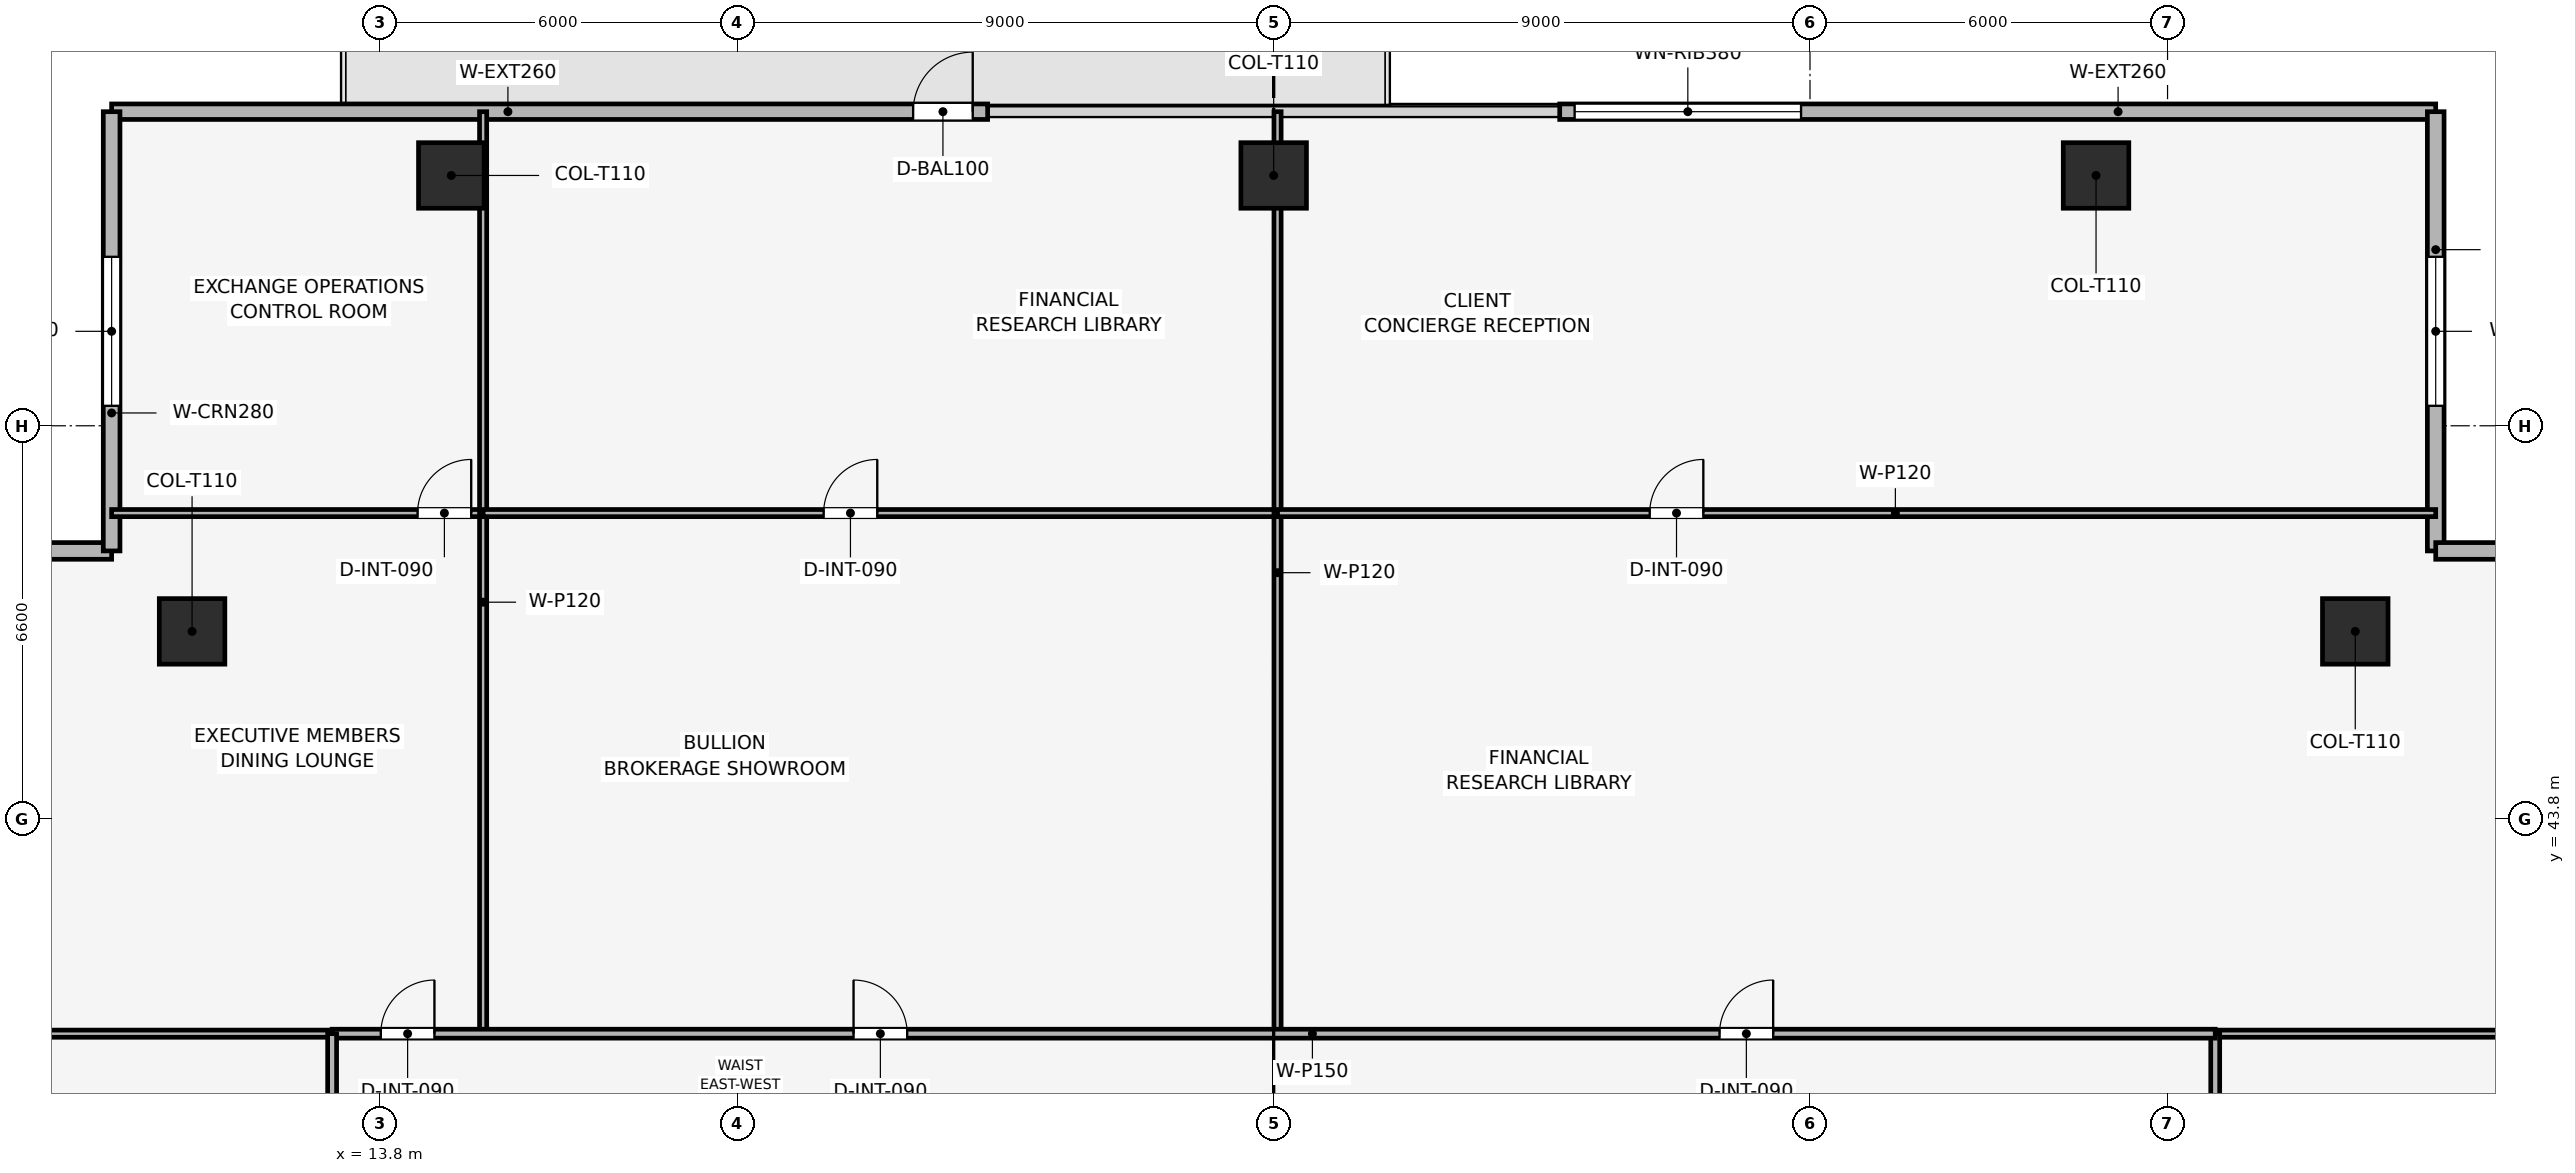
"""IFC4 building model, lengths in metres.
Left out: names, types, materials, properties, quantities, classifications, styles, units other than length and angle.
Written with IfcOpenShell. Run it as: python <this file> out.ifc"""

import sys

from ifc_helpers import new_model, si_unit, direction, frame, frame_2d, origin, origin_2d, place, context, subcontext, project, spatial, rectangle, extrude, element, fill, save


model = new_model("IFC4")
c1 = context("Model", 3, precision=1e-05, world=origin(), true_north=direction((0.0, 1.0)))
c2 = subcontext(c1, "Body", "Model", "MODEL_VIEW")
j1 = project(units=[si_unit("LENGTHUNIT", "METRE"), si_unit("PLANEANGLEUNIT", "RADIAN")], contexts=[c1])
p1 = place(None, origin())
s1 = spatial("IfcSite", under=j1, at=p1, CompositionType="ELEMENT")
p2 = place(p1, origin())
s2 = spatial("IfcBuilding", under=s1, at=p2, CompositionType="ELEMENT")
p3 = place(p2, frame((0.0, 0.0, 211.2)))
s3 = spatial("IfcBuildingStorey", under=s2, at=p3, CompositionType="ELEMENT", Elevation=211.2)
for number, where, z_axis, x_axis in (
    (1, (42.6, 54.6, 0.003), (0.0, 0.0, 1.0), (1.0, 0.0, 0.0)),
    (2, (28.8, 54.6, 0.003), (0.0, 0.0, 1.0), (1.0, 0.0, 0.0)),
    (3, (15.0, 54.6, 0.003), (0.0, 0.0, 1.0), (1.0, 0.0, 0.0)),
    (4, (46.95, 46.95, 0.003), (0.0, 0.0, 1.0), (1.0, 0.0, 0.0)),
    (5, (10.65, 46.95, 0.003), (0.0, 0.0, 1.0), (1.0, 0.0, 0.0)),
):
    element("IfcColumn", number, at=place(p3, frame(where, z_axis=z_axis, x_axis=x_axis)), inside=s3, PredefinedType="COLUMN", context=c2, shape_type="SweptSolid", body=[
        extrude(rectangle(XDim=1.1, YDim=1.1, at=origin_2d()), origin(), (0.0, 0.0, 1.0), 3.494),
    ])
p4 = place(p3, frame((9.3, 55.67, 0.0), z_axis=(0.0, 0.0, 1.0), x_axis=(1.0, 0.0, 0.0)))
e6 = element("IfcWall", 6, at=p4, inside=s3, PredefinedType="SOLIDWALL", context=c2, shape_type="SweptSolid", body=[
    extrude(rectangle(XDim=14.7, YDim=0.26, at=frame_2d((7.35, 0.0))), origin(), (0.0, 0.0, 1.0), 3.5),
])
p5 = place(p4, frame((13.45, 0.0, 0.0)))
e7 = element("IfcOpeningElement", 7, at=p5, cuts=e6, PredefinedType="OPENING", context=c2, shape_type="SweptSolid", body=[
    extrude(rectangle(XDim=1.0, YDim=2.2, at=frame_2d((0.5, 1.1))), frame((0.0, 0.14, 0.0), z_axis=(0.0, -1.0, 0.0), x_axis=(1.0, 0.0, 0.0)), (0.0, 0.0, 1.0), 0.28),
])
p6 = place(p3, frame((33.6, 55.67, 0.0), z_axis=(0.0, 0.0, 1.0), x_axis=(1.0, 0.0, 0.0)))
e8 = element("IfcWall", 8, at=p6, inside=s3, PredefinedType="SOLIDWALL", context=c2, shape_type="SweptSolid", body=[
    extrude(rectangle(XDim=14.7, YDim=0.26, at=frame_2d((7.35, 0.0))), origin(), (0.0, 0.0, 1.0), 3.5),
])
p7 = place(p6, frame((0.25, 0.0, 0.9)))
e9 = element("IfcOpeningElement", 9, at=p7, cuts=e8, PredefinedType="OPENING", context=c2, shape_type="SweptSolid", body=[
    extrude(rectangle(XDim=3.8, YDim=1.9, at=frame_2d((1.9, 0.95))), frame((0.0, 0.14, 0.0), z_axis=(0.0, -1.0, 0.0), x_axis=(1.0, 0.0, 0.0)), (0.0, 0.0, 1.0), 0.28),
])
p8 = place(p3, frame((1.93, 48.3, 0.0), z_axis=(0.0, 0.0, 1.0), x_axis=(1.0, 0.0, 0.0)))
e10 = element("IfcWall", 10, at=p8, inside=s3, PredefinedType="SOLIDWALL", context=c2, shape_type="SweptSolid", body=[
    extrude(rectangle(XDim=7.37, YDim=0.28, at=frame_2d((3.685, 0.0))), origin(), (0.0, 0.0, 1.0), 3.5),
])
p9 = place(p8, frame((2.435, 0.0, 0.9)))
e11 = element("IfcOpeningElement", 11, at=p9, cuts=e10, PredefinedType="OPENING", context=c2, shape_type="SweptSolid", body=[
    extrude(rectangle(XDim=2.5, YDim=1.9, at=frame_2d((1.25, 0.95))), frame((0.0, 0.15, 0.0), z_axis=(0.0, -1.0, 0.0), x_axis=(1.0, 0.0, 0.0)), (0.0, 0.0, 1.0), 0.3),
])
p10 = place(p3, frame((9.3, 48.3, 0.0), z_axis=(0.0, 0.0, 1.0), x_axis=(0.0, 1.0, 0.0)))
e12 = element("IfcWall", 12, at=p10, inside=s3, PredefinedType="SOLIDWALL", context=c2, shape_type="SweptSolid", body=[
    extrude(rectangle(XDim=7.37, YDim=0.28, at=frame_2d((3.685, 0.0))), origin(), (0.0, 0.0, 1.0), 3.5),
])
p11 = place(p10, frame((2.435, 0.0, 0.9)))
e13 = element("IfcOpeningElement", 13, at=p11, cuts=e12, PredefinedType="OPENING", context=c2, shape_type="SweptSolid", body=[
    extrude(rectangle(XDim=2.5, YDim=1.9, at=frame_2d((1.25, 0.95))), frame((0.0, 0.15, 0.0), z_axis=(0.0, -1.0, 0.0), x_axis=(1.0, 0.0, 0.0)), (0.0, 0.0, 1.0), 0.3),
])
p12 = place(p3, frame((48.3, 55.67, 0.0), z_axis=(0.0, 0.0, 1.0), x_axis=(0.0, -1.0, 0.0)))
e14 = element("IfcWall", 14, at=p12, inside=s3, PredefinedType="SOLIDWALL", context=c2, shape_type="SweptSolid", body=[
    extrude(rectangle(XDim=7.37, YDim=0.28, at=frame_2d((3.685, 0.0))), origin(), (0.0, 0.0, 1.0), 3.5),
])
p13 = place(p12, frame((2.435, 0.0, 0.9)))
e15 = element("IfcOpeningElement", 15, at=p13, cuts=e14, PredefinedType="OPENING", context=c2, shape_type="SweptSolid", body=[
    extrude(rectangle(XDim=2.5, YDim=1.9, at=frame_2d((1.25, 0.95))), frame((0.0, 0.15, 0.0), z_axis=(0.0, -1.0, 0.0), x_axis=(1.0, 0.0, 0.0)), (0.0, 0.0, 1.0), 0.3),
])
p14 = place(p3, frame((48.3, 48.3, 0.0), z_axis=(0.0, 0.0, 1.0), x_axis=(1.0, 0.0, 0.0)))
e16 = element("IfcWall", 16, at=p14, inside=s3, PredefinedType="SOLIDWALL", context=c2, shape_type="SweptSolid", body=[
    extrude(rectangle(XDim=7.37, YDim=0.28, at=frame_2d((3.685, 0.0))), origin(), (0.0, 0.0, 1.0), 3.5),
])
p15 = place(p14, frame((2.435, 0.0, 0.9)))
e17 = element("IfcOpeningElement", 17, at=p15, cuts=e16, PredefinedType="OPENING", context=c2, shape_type="SweptSolid", body=[
    extrude(rectangle(XDim=2.5, YDim=1.9, at=frame_2d((1.25, 0.95))), frame((0.0, 0.15, 0.0), z_axis=(0.0, -1.0, 0.0), x_axis=(1.0, 0.0, 0.0)), (0.0, 0.0, 1.0), 0.3),
])
p16 = place(p3, frame((9.3, 48.935, 0.0), z_axis=(0.0, 0.0, 1.0), x_axis=(1.0, 0.0, 0.0)))
e18 = element("IfcWall", 18, at=p16, inside=s3, PredefinedType="PARTITIONING", context=c2, shape_type="SweptSolid", body=[
    extrude(rectangle(XDim=6.234, YDim=0.12, at=frame_2d((3.117, 0.0))), origin(), (0.0, 0.0, 1.0), 2.885),
])
p17 = place(p16, frame((5.134, 0.0, 0.0)))
e19 = element("IfcOpeningElement", 19, at=p17, cuts=e18, PredefinedType="OPENING", context=c2, shape_type="SweptSolid", body=[
    extrude(rectangle(XDim=0.9, YDim=2.1, at=frame_2d((0.45, 1.05))), frame((0.0, 0.07, 0.0), z_axis=(0.0, -1.0, 0.0), x_axis=(1.0, 0.0, 0.0)), (0.0, 0.0, 1.0), 0.14),
])
p18 = place(p3, frame((15.534, 40.2, 0.0), z_axis=(0.0, 0.0, 1.0), x_axis=(0.0, 1.0, 0.0)))
e20 = element("IfcWall", 20, at=p18, inside=s3, PredefinedType="PARTITIONING", context=c2, shape_type="SweptSolid", body=[
    extrude(rectangle(XDim=15.47, YDim=0.12, at=frame_2d((7.735, 0.0))), origin(), (0.0, 0.0, 1.0), 2.885),
])
p19 = place(p3, frame((15.534, 48.935, 0.0), z_axis=(0.0, 0.0, 1.0), x_axis=(1.0, 0.0, 0.0)))
e21 = element("IfcWall", 21, at=p19, inside=s3, PredefinedType="PARTITIONING", context=c2, shape_type="SweptSolid", body=[
    extrude(rectangle(XDim=13.331, YDim=0.12, at=frame_2d((6.666, 0.0))), origin(), (0.0, 0.0, 1.0), 3.035),
])
p20 = place(p19, frame((5.714, 0.0, 0.0)))
e22 = element("IfcOpeningElement", 22, at=p20, cuts=e21, PredefinedType="OPENING", context=c2, shape_type="SweptSolid", body=[
    extrude(rectangle(XDim=0.9, YDim=2.1, at=frame_2d((0.45, 1.05))), frame((0.0, 0.07, 0.0), z_axis=(0.0, -1.0, 0.0), x_axis=(1.0, 0.0, 0.0)), (0.0, 0.0, 1.0), 0.14),
])
p21 = place(p3, frame((28.865, 40.2, 0.0), z_axis=(0.0, 0.0, 1.0), x_axis=(0.0, 1.0, 0.0)))
e23 = element("IfcWall", 23, at=p21, inside=s3, PredefinedType="PARTITIONING", context=c2, shape_type="SweptSolid", body=[
    extrude(rectangle(XDim=15.47, YDim=0.12, at=frame_2d((7.735, 0.0))), origin(), (0.0, 0.0, 1.0), 2.985),
])
p22 = place(p3, frame((28.865, 48.935, 0.0), z_axis=(0.0, 0.0, 1.0), x_axis=(1.0, 0.0, 0.0)))
e24 = element("IfcWall", 24, at=p22, inside=s3, PredefinedType="PARTITIONING", context=c2, shape_type="SweptSolid", body=[
    extrude(rectangle(XDim=19.435, YDim=0.12, at=frame_2d((9.718, 0.0))), origin(), (0.0, 0.0, 1.0), 2.885),
])
p23 = place(p22, frame((6.245, 0.0, 0.0)))
e25 = element("IfcOpeningElement", 25, at=p23, cuts=e24, PredefinedType="OPENING", context=c2, shape_type="SweptSolid", body=[
    extrude(rectangle(XDim=0.9, YDim=2.1, at=frame_2d((0.45, 1.05))), frame((0.0, 0.07, 0.0), z_axis=(0.0, -1.0, 0.0), x_axis=(1.0, 0.0, 0.0)), (0.0, 0.0, 1.0), 0.14),
])
p24 = place(p3, frame((1.93, 40.2, 0.0), z_axis=(0.0, 0.0, 1.0), x_axis=(1.0, 0.0, 0.0)))
e26 = element("IfcWall", 26, at=p24, inside=s3, PredefinedType="PARTITIONING", context=c2, shape_type="SweptSolid", body=[
    extrude(rectangle(XDim=11.07, YDim=0.12, at=frame_2d((5.535, 0.0))), origin(), (0.0, 0.0, 1.0), 2.885),
])
p25 = place(p3, frame((44.6, 40.2, 0.0), z_axis=(0.0, 0.0, 1.0), x_axis=(1.0, 0.0, 0.0)))
e27 = element("IfcWall", 27, at=p25, inside=s3, PredefinedType="PARTITIONING", context=c2, shape_type="SweptSolid", body=[
    extrude(rectangle(XDim=11.07, YDim=0.12, at=frame_2d((5.535, 0.0))), origin(), (0.0, 0.0, 1.0), 2.885),
])
p26 = place(p3, frame((44.6, 37.8, 0.0), z_axis=(0.0, 0.0, 1.0), x_axis=(0.0, 1.0, 0.0)))
e28 = element("IfcWall", 28, at=p26, inside=s3, PredefinedType="PARTITIONING", context=c2, shape_type="SweptSolid", body=[
    extrude(rectangle(XDim=2.4, YDim=0.15, at=frame_2d((1.2, 0.0))), origin(), (0.0, 0.0, 1.0), 3.5),
])
p27 = place(p3, frame((13.0, 40.2, 0.0), z_axis=(0.0, 0.0, 1.0), x_axis=(1.0, 0.0, 0.0)))
e29 = element("IfcWall", 29, at=p27, inside=s3, PredefinedType="PARTITIONING", context=c2, shape_type="SweptSolid", body=[
    extrude(rectangle(XDim=31.6, YDim=0.15, at=frame_2d((15.8, 0.0))), origin(), (0.0, 0.0, 1.0), 3.035),
])
p28 = place(p27, frame((0.817, 0.0, 0.0)))
e30 = element("IfcOpeningElement", 30, at=p28, cuts=e29, PredefinedType="OPENING", context=c2, shape_type="SweptSolid", body=[
    extrude(rectangle(XDim=0.9, YDim=2.1, at=frame_2d((0.45, 1.05))), frame((0.0, 0.085, 0.0), z_axis=(0.0, -1.0, 0.0), x_axis=(1.0, 0.0, 0.0)), (0.0, 0.0, 1.0), 0.17),
])
p29 = place(p27, frame((8.75, 0.0, 0.0)))
e31 = element("IfcOpeningElement", 31, at=p29, cuts=e29, PredefinedType="OPENING", context=c2, shape_type="SweptSolid", body=[
    extrude(rectangle(XDim=0.9, YDim=2.1, at=frame_2d((0.45, 1.05))), frame((0.0, 0.085, 0.0), z_axis=(0.0, -1.0, 0.0), x_axis=(1.0, 0.0, 0.0)), (0.0, 0.0, 1.0), 0.17),
])
p30 = place(p27, frame((23.282, 0.0, 0.0)))
e32 = element("IfcOpeningElement", 32, at=p30, cuts=e29, PredefinedType="OPENING", context=c2, shape_type="SweptSolid", body=[
    extrude(rectangle(XDim=0.9, YDim=2.1, at=frame_2d((0.45, 1.05))), frame((0.0, 0.085, 0.0), z_axis=(0.0, -1.0, 0.0), x_axis=(1.0, 0.0, 0.0)), (0.0, 0.0, 1.0), 0.17),
])
p31 = place(p3, frame((13.0, 17.4, 0.0), z_axis=(0.0, 0.0, 1.0), x_axis=(0.0, 1.0, 0.0)))
e33 = element("IfcWall", 33, at=p31, inside=s3, PredefinedType="PARTITIONING", context=c2, shape_type="SweptSolid", body=[
    extrude(rectangle(XDim=22.8, YDim=0.15, at=frame_2d((11.4, 0.0))), origin(), (0.0, 0.0, 1.0), 3.035),
])
p32 = place(p31, frame((10.95, 0.0, 0.0)))
e34 = element("IfcOpeningElement", 34, at=p32, cuts=e33, PredefinedType="OPENING", context=c2, shape_type="SweptSolid", body=[
    extrude(rectangle(XDim=0.9, YDim=2.1, at=frame_2d((0.45, 1.05))), frame((0.0, 0.085, 0.0), z_axis=(0.0, -1.0, 0.0), x_axis=(1.0, 0.0, 0.0)), (0.0, 0.0, 1.0), 0.17),
])
p33 = place(p5, origin())
e35 = element("IfcDoor", 35, at=p33, inside=s3, OperationType="SINGLE_SWING_RIGHT", PredefinedType="DOOR", context=c2, shape_type="SweptSolid", body=[
    extrude(rectangle(XDim=1.0, YDim=2.2, at=frame_2d((0.5, 1.1))), frame((0.0, 0.025, 0.0), z_axis=(0.0, -1.0, 0.0), x_axis=(1.0, 0.0, 0.0)), (0.0, 0.0, 1.0), 0.05),
])
fill(e7, e35)
p34 = place(p7, origin())
e36 = element("IfcWindow", 36, at=p34, inside=s3, PartitioningType="SINGLE_PANEL", PredefinedType="WINDOW", context=c2, shape_type="SweptSolid", body=[
    extrude(rectangle(XDim=3.8, YDim=1.9, at=frame_2d((1.9, 0.95))), frame((0.0, 0.03, 0.0), z_axis=(0.0, -1.0, 0.0), x_axis=(1.0, 0.0, 0.0)), (0.0, 0.0, 1.0), 0.06),
])
fill(e9, e36)
p35 = place(p11, origin())
e37 = element("IfcWindow", 37, at=p35, inside=s3, PartitioningType="SINGLE_PANEL", PredefinedType="WINDOW", context=c2, shape_type="SweptSolid", body=[
    extrude(rectangle(XDim=2.5, YDim=1.9, at=frame_2d((1.25, 0.95))), frame((0.0, 0.03, 0.0), z_axis=(0.0, -1.0, 0.0), x_axis=(1.0, 0.0, 0.0)), (0.0, 0.0, 1.0), 0.06),
])
fill(e13, e37)
p36 = place(p13, origin())
e38 = element("IfcWindow", 38, at=p36, inside=s3, PartitioningType="SINGLE_PANEL", PredefinedType="WINDOW", context=c2, shape_type="SweptSolid", body=[
    extrude(rectangle(XDim=2.5, YDim=1.9, at=frame_2d((1.25, 0.95))), frame((0.0, 0.03, 0.0), z_axis=(0.0, -1.0, 0.0), x_axis=(1.0, 0.0, 0.0)), (0.0, 0.0, 1.0), 0.06),
])
fill(e15, e38)
p37 = place(p17, origin())
e39 = element("IfcDoor", 39, at=p37, inside=s3, OperationType="SINGLE_SWING_RIGHT", PredefinedType="DOOR", context=c2, shape_type="SweptSolid", body=[
    extrude(rectangle(XDim=0.9, YDim=2.1, at=frame_2d((0.45, 1.05))), frame((0.0, 0.025, 0.0), z_axis=(0.0, -1.0, 0.0), x_axis=(1.0, 0.0, 0.0)), (0.0, 0.0, 1.0), 0.05),
])
fill(e19, e39)
p38 = place(p20, origin())
e40 = element("IfcDoor", 40, at=p38, inside=s3, OperationType="SINGLE_SWING_RIGHT", PredefinedType="DOOR", context=c2, shape_type="SweptSolid", body=[
    extrude(rectangle(XDim=0.9, YDim=2.1, at=frame_2d((0.45, 1.05))), frame((0.0, 0.025, 0.0), z_axis=(0.0, -1.0, 0.0), x_axis=(1.0, 0.0, 0.0)), (0.0, 0.0, 1.0), 0.05),
])
fill(e22, e40)
p39 = place(p23, origin())
e41 = element("IfcDoor", 41, at=p39, inside=s3, OperationType="SINGLE_SWING_RIGHT", PredefinedType="DOOR", context=c2, shape_type="SweptSolid", body=[
    extrude(rectangle(XDim=0.9, YDim=2.1, at=frame_2d((0.45, 1.05))), frame((0.0, 0.025, 0.0), z_axis=(0.0, -1.0, 0.0), x_axis=(1.0, 0.0, 0.0)), (0.0, 0.0, 1.0), 0.05),
])
fill(e25, e41)
p40 = place(p28, origin())
e42 = element("IfcDoor", 42, at=p40, inside=s3, OperationType="SINGLE_SWING_RIGHT", PredefinedType="DOOR", context=c2, shape_type="SweptSolid", body=[
    extrude(rectangle(XDim=0.9, YDim=2.1, at=frame_2d((0.45, 1.05))), frame((0.0, 0.025, 0.0), z_axis=(0.0, -1.0, 0.0), x_axis=(1.0, 0.0, 0.0)), (0.0, 0.0, 1.0), 0.05),
])
fill(e30, e42)
p41 = place(p29, origin())
e43 = element("IfcDoor", 43, at=p41, inside=s3, OperationType="SINGLE_SWING_LEFT", PredefinedType="DOOR", context=c2, shape_type="SweptSolid", body=[
    extrude(rectangle(XDim=0.9, YDim=2.1, at=frame_2d((0.45, 1.05))), frame((0.0, 0.025, 0.0), z_axis=(0.0, -1.0, 0.0), x_axis=(1.0, 0.0, 0.0)), (0.0, 0.0, 1.0), 0.05),
])
fill(e31, e43)
p42 = place(p30, origin())
e44 = element("IfcDoor", 44, at=p42, inside=s3, OperationType="SINGLE_SWING_RIGHT", PredefinedType="DOOR", context=c2, shape_type="SweptSolid", body=[
    extrude(rectangle(XDim=0.9, YDim=2.1, at=frame_2d((0.45, 1.05))), frame((0.0, 0.025, 0.0), z_axis=(0.0, -1.0, 0.0), x_axis=(1.0, 0.0, 0.0)), (0.0, 0.0, 1.0), 0.05),
])
fill(e32, e44)
save(model, sys.argv[1])
